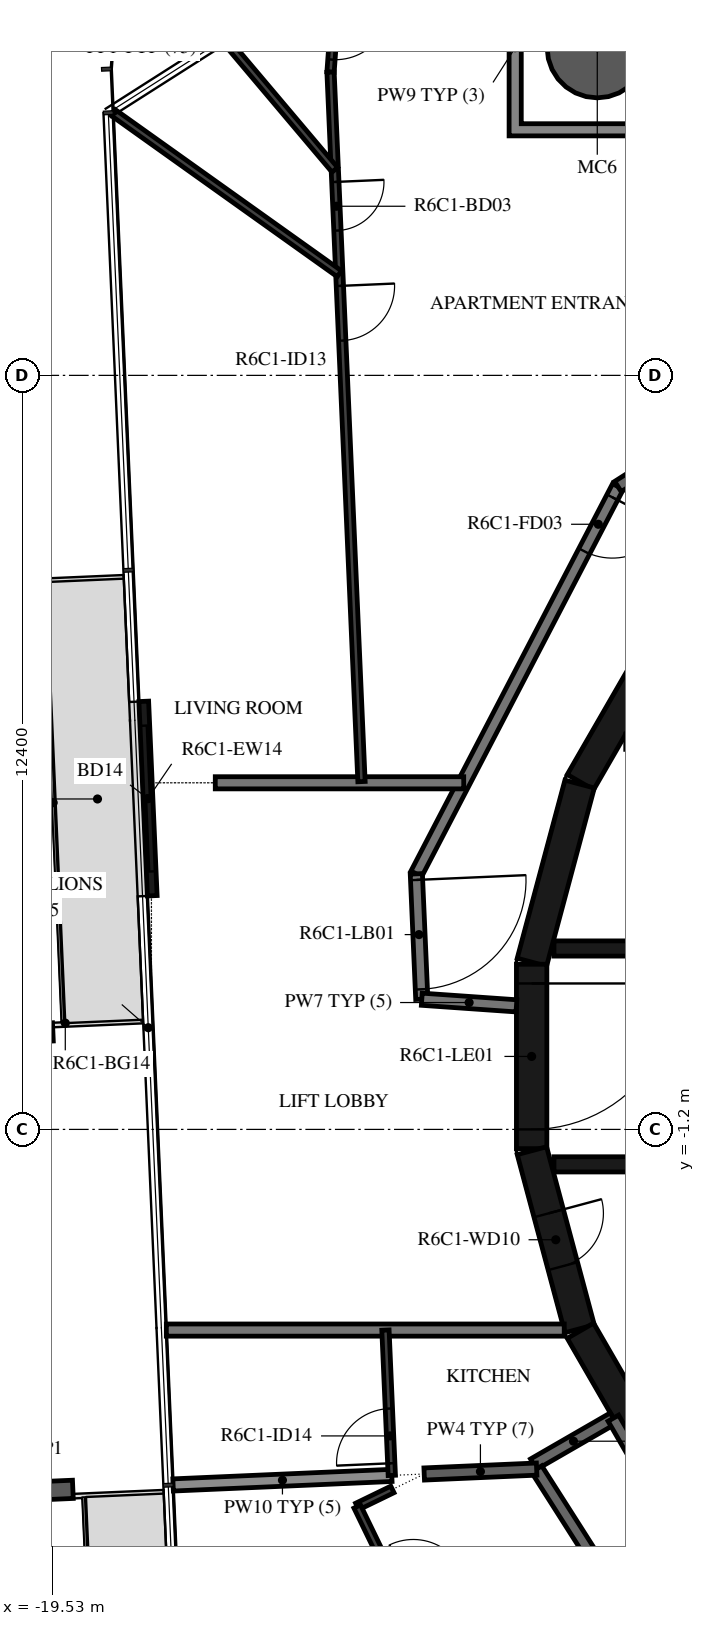
"""IFC4 building model, lengths in metres.
Left out: names, types, materials, properties, quantities, classifications, styles, units other than length and angle.
Written with IfcOpenShell. Run it as: python <this file> out.ifc"""

import sys

from ifc_helpers import new_model, si_unit, direction, frame, frame_2d, origin, origin_2d, place, context, subcontext, project, spatial, polyline, rectangle, hollow_circle, i_section, outline, extrude, element, fill, save


model = new_model("IFC4")
c1 = context("Model", 3, precision=1e-05, world=origin(), true_north=direction((0.0, 1.0)))
c2 = subcontext(c1, "Body", "Model", "MODEL_VIEW")
j1 = project(units=[si_unit("LENGTHUNIT", "METRE"), si_unit("PLANEANGLEUNIT", "RADIAN")], contexts=[c1])
p1 = place(None, origin())
s1 = spatial("IfcSite", under=j1, at=p1, CompositionType="ELEMENT")
p2 = place(p1, origin())
s2 = spatial("IfcBuilding", under=s1, at=p2, CompositionType="ELEMENT")
p3 = place(p2, frame((0.0, 0.0, 251.2)))
s3 = spatial("IfcBuildingStorey", under=s2, at=p3, CompositionType="ELEMENT", Elevation=251.2)
p4 = place(p3, frame((-10.568, 16.588, -0.38), z_axis=(0.0, 0.0, 1.0), x_axis=(1.0, 0.0, 0.0)))
e1 = element("IfcColumn", 1, at=p4, inside=s3, PredefinedType="COLUMN", context=c2, shape_type="SweptSolid", body=[
    extrude(hollow_circle(Radius=0.825, WallThickness=0.04, at=origin_2d()), origin(), (0.0, 0.0, 1.0), 3.5),
])
for number, where, z_axis, x_axis in (
    (2, (-19.97, 0.384, -0.38), (0.0, 0.0, 1.0), (-0.044, 0.999, 0.0)),
    (3, (-19.642, -7.139, -0.38), (0.0, 0.0, 1.0), (-0.044, 0.999, 0.0)),
):
    element("IfcColumn", number, at=place(p3, frame(where, z_axis=z_axis, x_axis=x_axis)), inside=s3, PredefinedType="COLUMN", context=c2, shape_type="SweptSolid", body=[
        extrude(i_section(OverallWidth=0.3, OverallDepth=0.9, WebThickness=0.019, FlangeThickness=0.035, FilletRadius=0.03, at=origin_2d()), origin(), (0.0, 0.0, 1.0), 3.5),
    ])
p5 = place(p3, frame((-18.026, 5.839, 0.0), z_axis=(0.0, 0.0, 1.0), x_axis=(0.043563034632, -0.999050680403, 0.0)))
e4 = element("IfcWall", 4, at=p5, inside=s3, PredefinedType="STANDARD", context=c2, shape_type="SweptSolid", body=[
    extrude(rectangle(XDim=3.2, YDim=0.16, at=frame_2d((1.6, 0.0))), origin(), (0.0, 0.0, 1.0), 3.12),
])
p6 = place(p5, frame((0.4, 0.0, 0.0)))
e5 = element("IfcOpeningElement", 5, at=p6, cuts=e4, PredefinedType="OPENING", context=c2, shape_type="SweptSolid", body=[
    extrude(rectangle(XDim=2.4, YDim=2.4, at=frame_2d((1.2, 1.2))), frame((0.0, 0.09, 0.0), z_axis=(0.0, -1.0, 0.0), x_axis=(1.0, 0.0, 0.0)), (0.0, 0.0, 1.0), 0.18),
])
for number, where, z_axis, x_axis in (
    (6, (-9.329, 7.137, 0.0), (0.0, 0.0, 1.0), (-0.5, -0.866, 0.0)),
    (7, (-10.858, 4.479, 0.0), (0.0, 0.0, 1.0), (-0.259, -0.966, 0.0)),
):
    element("IfcWall", number, at=place(p3, frame(where, z_axis=z_axis, x_axis=x_axis)), inside=s3, PredefinedType="SHEAR", context=c2, shape_type="SweptSolid", body=[
        extrude(rectangle(XDim=3.033, YDim=0.5, at=frame_2d((1.516, 0.0))), origin(), (0.0, 0.0, 1.0), 3.12),
    ])
p7 = place(p3, frame((-11.647, 1.516, 0.0), z_axis=(0.0, 0.0, 1.0), x_axis=(0.0, -1.0, 0.0)))
e8 = element("IfcWall", 8, at=p7, inside=s3, PredefinedType="SHEAR", context=c2, shape_type="SweptSolid", body=[
    extrude(rectangle(XDim=3.033, YDim=0.5, at=frame_2d((1.516, 0.0))), origin(), (0.0, 0.0, 1.0), 3.12),
])
p8 = place(p7, frame((0.316, 0.0, 0.0)))
e9 = element("IfcOpeningElement", 9, at=p8, cuts=e8, PredefinedType="OPENING", context=c2, shape_type="SweptSolid", body=[
    extrude(rectangle(XDim=2.4, YDim=2.1, at=frame_2d((1.2, 1.05))), frame((0.0, 0.26, 0.0), z_axis=(0.0, -1.0, 0.0), x_axis=(1.0, 0.0, 0.0)), (0.0, 0.0, 1.0), 0.52),
])
p9 = place(p3, frame((-11.643, -1.55, 0.0), z_axis=(0.0, 0.0, 1.0), x_axis=(0.258734743916, -0.965948410781, 0.0)))
e10 = element("IfcWall", 10, at=p9, inside=s3, PredefinedType="SHEAR", context=c2, shape_type="SweptSolid", body=[
    extrude(rectangle(XDim=3.033, YDim=0.5, at=frame_2d((1.516, 0.0))), origin(), (0.0, 0.0, 1.0), 3.12),
])
p10 = place(p9, frame((1.066, 0.0, 0.0)))
e11 = element("IfcOpeningElement", 11, at=p10, cuts=e10, PredefinedType="OPENING", context=c2, shape_type="SweptSolid", body=[
    extrude(rectangle(XDim=0.9, YDim=2.1, at=frame_2d((0.45, 1.05))), frame((0.0, 0.26, 0.0), z_axis=(0.0, -1.0, 0.0), x_axis=(1.0, 0.0, 0.0)), (0.0, 0.0, 1.0), 0.52),
])
p11 = place(p3, frame((-10.845, -4.51, 0.0), z_axis=(0.0, 0.0, 1.0), x_axis=(0.500087131594, -0.865975092491, 0.0)))
e12 = element("IfcWall", 12, at=p11, inside=s3, PredefinedType="SHEAR", context=c2, shape_type="SweptSolid", body=[
    extrude(rectangle(XDim=3.033, YDim=0.5, at=frame_2d((1.516, 0.0))), origin(), (0.0, 0.0, 1.0), 3.12),
])
p12 = place(p3, frame((-11.28, 1.775, 0.0), z_axis=(0.0, 0.0, 1.0), x_axis=(1.0, 0.0, 0.0)))
e13 = element("IfcWall", 13, at=p12, inside=s3, PredefinedType="SHEAR", context=c2, shape_type="SweptSolid", body=[
    extrude(rectangle(XDim=14.38, YDim=0.25, at=frame_2d((7.19, 0.0))), origin(), (0.0, 0.0, 1.0), 3.12),
])
p13 = place(p12, frame((10.73, 0.0, 0.0)))
e14 = element("IfcOpeningElement", 14, at=p13, cuts=e13, PredefinedType="OPENING", context=c2, shape_type="SweptSolid", body=[
    extrude(rectangle(XDim=1.1, YDim=2.1, at=frame_2d((0.55, 1.05))), frame((0.0, 0.135, 0.0), z_axis=(0.0, -1.0, 0.0), x_axis=(1.0, 0.0, 0.0)), (0.0, 0.0, 1.0), 0.27),
])
p14 = place(p12, frame((12.88, 0.0, 0.0)))
e15 = element("IfcOpeningElement", 15, at=p14, cuts=e13, PredefinedType="OPENING", context=c2, shape_type="SweptSolid", body=[
    extrude(rectangle(XDim=1.1, YDim=2.1, at=frame_2d((0.55, 1.05))), frame((0.0, 0.135, 0.0), z_axis=(0.0, -1.0, 0.0), x_axis=(1.0, 0.0, 0.0)), (0.0, 0.0, 1.0), 0.27),
])
p15 = place(p12, frame((5.455, 0.0, 0.0)))
e16 = element("IfcOpeningElement", 16, at=p15, cuts=e13, PredefinedType="OPENING", context=c2, shape_type="SweptSolid", body=[
    extrude(rectangle(XDim=0.9, YDim=2.1, at=frame_2d((0.45, 1.05))), frame((0.0, 0.135, 0.0), z_axis=(0.0, -1.0, 0.0), x_axis=(1.0, 0.0, 0.0)), (0.0, 0.0, 1.0), 0.27),
])
p16 = place(p3, frame((-11.28, -1.775, 0.0), z_axis=(0.0, 0.0, 1.0), x_axis=(1.0, 0.0, 0.0)))
e17 = element("IfcWall", 17, at=p16, inside=s3, PredefinedType="SHEAR", context=c2, shape_type="SweptSolid", body=[
    extrude(rectangle(XDim=14.38, YDim=0.25, at=frame_2d((7.19, 0.0))), origin(), (0.0, 0.0, 1.0), 3.12),
])
p17 = place(p16, frame((12.88, 0.0, 0.0)))
e18 = element("IfcOpeningElement", 18, at=p17, cuts=e17, PredefinedType="OPENING", context=c2, shape_type="SweptSolid", body=[
    extrude(rectangle(XDim=1.1, YDim=2.1, at=frame_2d((0.55, 1.05))), frame((0.0, 0.135, 0.0), z_axis=(0.0, -1.0, 0.0), x_axis=(1.0, 0.0, 0.0)), (0.0, 0.0, 1.0), 0.27),
])
p18 = place(p16, frame((6.53, 0.0, 0.0)))
e19 = element("IfcOpeningElement", 19, at=p18, cuts=e17, PredefinedType="OPENING", context=c2, shape_type="SweptSolid", body=[
    extrude(rectangle(XDim=0.9, YDim=2.1, at=frame_2d((0.45, 1.05))), frame((0.0, 0.135, 0.0), z_axis=(0.0, -1.0, 0.0), x_axis=(1.0, 0.0, 0.0)), (0.0, 0.0, 1.0), 0.27),
])
p19 = place(p16, frame((8.68, 0.0, 0.0)))
e20 = element("IfcOpeningElement", 20, at=p19, cuts=e17, PredefinedType="OPENING", context=c2, shape_type="SweptSolid", body=[
    extrude(rectangle(XDim=0.9, YDim=2.1, at=frame_2d((0.45, 1.05))), frame((0.0, 0.135, 0.0), z_axis=(0.0, -1.0, 0.0), x_axis=(1.0, 0.0, 0.0)), (0.0, 0.0, 1.0), 0.27),
])
p20 = place(p16, frame((10.83, 0.0, 0.0)))
e21 = element("IfcOpeningElement", 21, at=p20, cuts=e17, PredefinedType="OPENING", context=c2, shape_type="SweptSolid", body=[
    extrude(rectangle(XDim=0.9, YDim=2.1, at=frame_2d((0.45, 1.05))), frame((0.0, 0.135, 0.0), z_axis=(0.0, -1.0, 0.0), x_axis=(1.0, 0.0, 0.0)), (0.0, 0.0, 1.0), 0.27),
])
p21 = place(p3, frame((-10.228, 9.372, 0.0), z_axis=(0.0, 0.0, 1.0), x_axis=(-0.461759464021, -0.887005184532, 0.0)))
e22 = element("IfcWall", 22, at=p21, inside=s3, PredefinedType="STANDARD", context=c2, shape_type="SweptSolid", body=[
    extrude(rectangle(XDim=7.181, YDim=0.2, at=frame_2d((3.591, 0.0))), origin(), (0.0, 0.0, 1.0), 3.12),
])
p22 = place(p21, frame((0.2, 0.0, 0.0)))
e23 = element("IfcOpeningElement", 23, at=p22, cuts=e22, PredefinedType="OPENING", context=c2, shape_type="SweptSolid", body=[
    extrude(rectangle(XDim=1.0, YDim=2.1, at=frame_2d((0.5, 1.05))), frame((0.0, 0.11, 0.0), z_axis=(0.0, -1.0, 0.0), x_axis=(1.0, 0.0, 0.0)), (0.0, 0.0, 1.0), 0.22),
])
p23 = place(p3, frame((-13.544, 3.003, 0.0), z_axis=(0.0, 0.0, 1.0), x_axis=(0.043652842459, -0.99904676034, 0.0)))
e24 = element("IfcWall", 24, at=p23, inside=s3, PredefinedType="STANDARD", context=c2, shape_type="SweptSolid", body=[
    extrude(rectangle(XDim=2.064, YDim=0.2, at=frame_2d((1.032, 0.0))), origin(), (0.0, 0.0, 1.0), 3.12),
])
p24 = place(p23, frame((0.1, 0.0, 0.0)))
e25 = element("IfcOpeningElement", 25, at=p24, cuts=e24, PredefinedType="OPENING", context=c2, shape_type="SweptSolid", body=[
    extrude(rectangle(XDim=1.8, YDim=2.1, at=frame_2d((0.9, 1.05))), frame((0.0, 0.11, 0.0), z_axis=(0.0, -1.0, 0.0), x_axis=(1.0, 0.0, 0.0)), (0.0, 0.0, 1.0), 0.22),
])
p25 = place(p3, frame((-13.454, 0.941, 0.0), z_axis=(0.0, 0.0, 1.0), x_axis=(0.99755155062, -0.069934997354, 0.0)))
e26 = element("IfcWall", 26, at=p25, inside=s3, PredefinedType="STANDARD", context=c2, shape_type="SweptSolid", body=[
    extrude(rectangle(XDim=1.561, YDim=0.2, at=frame_2d((0.78, 0.0))), origin(), (0.0, 0.0, 1.0), 3.12),
])
p26 = place(p3, frame((-4.172, 13.231, 0.0), z_axis=(0.0, 0.0, 1.0), x_axis=(-0.843388394728, -0.537304397561, 0.0)))
e27 = element("IfcWall", 27, at=p26, inside=s3, PredefinedType="STANDARD", context=c2, shape_type="SweptSolid", body=[
    extrude(rectangle(XDim=7.181, YDim=0.2, at=frame_2d((3.59, 0.0))), origin(), (0.0, 0.0, 1.0), 3.12),
])
p27 = place(p3, frame((-10.303, -5.949, 0.0), z_axis=(0.0, 0.0, 1.0), x_axis=(-0.866043382451, -0.499968858743, 0.0)))
e28 = element("IfcWall", 28, at=p27, inside=s3, PredefinedType="STANDARD", context=c2, shape_type="SweptSolid", body=[
    extrude(rectangle(XDim=1.515, YDim=0.2, at=frame_2d((0.758, 0.0))), origin(), (0.0, 0.0, 1.0), 3.12),
])
p28 = place(p3, frame((-9.52, -7.305, 0.0), z_axis=(0.0, 0.0, 1.0), x_axis=(-0.500028278809, 0.866009076391, 0.0)))
e29 = element("IfcWall", 29, at=p28, inside=s3, PredefinedType="STANDARD", context=c2, shape_type="SweptSolid", body=[
    extrude(rectangle(XDim=1.566, YDim=0.2, at=frame_2d((0.783, 0.0))), origin(), (0.0, 0.0, 1.0), 3.12),
])
p29 = place(p3, frame((-11.565, -6.786, 0.0), z_axis=(0.0, 0.0, 1.0), x_axis=(0.537297327359, -0.843392898958, 0.0)))
e30 = element("IfcWall", 30, at=p29, inside=s3, PredefinedType="STANDARD", context=c2, shape_type="SweptSolid", body=[
    extrude(rectangle(XDim=4.081, YDim=0.2, at=frame_2d((2.041, 0.0))), origin(), (0.0, 0.0, 1.0), 3.12),
])
p30 = place(p3, frame((-12.764, 4.5, 0.0), z_axis=(0.0, 0.0, 1.0), x_axis=(-1.0, 0.0, 0.0)))
e31 = element("IfcWall", 31, at=p30, inside=s3, PredefinedType="STANDARD", context=c2, shape_type="SweptSolid", body=[
    extrude(rectangle(XDim=4.086, YDim=0.2, at=frame_2d((2.043, 0.0))), origin(), (0.0, 0.0, 1.0), 3.12),
])
p31 = place(p3, frame((-17.655, -4.5, 0.0), z_axis=(0.0, 0.0, 1.0), x_axis=(1.0, 0.0, 0.0)))
e32 = element("IfcWall", 32, at=p31, inside=s3, PredefinedType="STANDARD", context=c2, shape_type="SweptSolid", body=[
    extrude(rectangle(XDim=6.543, YDim=0.2, at=frame_2d((3.272, 0.0))), origin(), (0.0, 0.0, 1.0), 3.12),
])
p32 = place(p3, frame((-17.544, -7.047, 0.0), z_axis=(0.0, 0.0, 1.0), x_axis=(0.999045894436, 0.043672655174, 0.0)))
e33 = element("IfcWall", 33, at=p32, inside=s3, PredefinedType="STANDARD", context=c2, shape_type="SweptSolid", body=[
    extrude(rectangle(XDim=3.6, YDim=0.2, at=frame_2d((1.8, 0.0))), origin(), (0.0, 0.0, 1.0), 2.73),
])
p33 = place(p3, frame((-13.414, -6.867, 0.0), z_axis=(0.0, 0.0, 1.0), x_axis=(0.999046427216, 0.043660465726, 0.0)))
e34 = element("IfcWall", 34, at=p33, inside=s3, PredefinedType="STANDARD", context=c2, shape_type="SweptSolid", body=[
    extrude(rectangle(XDim=1.851, YDim=0.2, at=frame_2d((0.925, 0.0))), origin(), (0.0, 0.0, 1.0), 3.12),
])
p34 = place(p3, frame((-14.865, 17.411, 0.0), z_axis=(0.0, 0.0, 1.0), x_axis=(-0.072618457011, -0.997359794508, 0.0)))
e35 = element("IfcWall", 35, at=p34, inside=s3, PredefinedType="PARTITIONING", context=c2, shape_type="SweptSolid", body=[
    extrude(rectangle(XDim=1.227, YDim=0.12, at=frame_2d((0.614, 0.0))), origin(), (0.0, 0.0, 1.0), 3.12),
])
p35 = place(p34, frame((0.12, 0.0, 0.0)))
e36 = element("IfcOpeningElement", 36, at=p35, cuts=e35, PredefinedType="OPENING", context=c2, shape_type="SweptSolid", body=[
    extrude(rectangle(XDim=0.9, YDim=2.1, at=frame_2d((0.45, 1.05))), frame((0.0, 0.07, 0.0), z_axis=(0.0, -1.0, 0.0), x_axis=(1.0, 0.0, 0.0)), (0.0, 0.0, 1.0), 0.14),
])
p36 = place(p3, frame((-14.955, 16.187, 0.0), z_axis=(0.0, 0.0, 1.0), x_axis=(0.04360777668, -0.999048728448, 0.0)))
e37 = element("IfcWall", 37, at=p36, inside=s3, PredefinedType="PARTITIONING", context=c2, shape_type="SweptSolid", body=[
    extrude(rectangle(XDim=11.679, YDim=0.12, at=frame_2d((5.839, 0.0))), origin(), (0.0, 0.0, 1.0), 3.12),
])
p37 = place(p36, frame((1.808, 0.0, 0.0)))
e38 = element("IfcOpeningElement", 38, at=p37, cuts=e37, PredefinedType="OPENING", context=c2, shape_type="SweptSolid", body=[
    extrude(rectangle(XDim=0.8, YDim=2.1, at=frame_2d((0.4, 1.05))), frame((0.0, 0.07, 0.0), z_axis=(0.0, -1.0, 0.0), x_axis=(1.0, 0.0, 0.0)), (0.0, 0.0, 1.0), 0.14),
])
p38 = place(p36, frame((3.519, 0.0, 0.0)))
e39 = element("IfcOpeningElement", 39, at=p38, cuts=e37, PredefinedType="OPENING", context=c2, shape_type="SweptSolid", body=[
    extrude(rectangle(XDim=0.9, YDim=2.1, at=frame_2d((0.45, 1.05))), frame((0.0, 0.07, 0.0), z_axis=(0.0, -1.0, 0.0), x_axis=(1.0, 0.0, 0.0)), (0.0, 0.0, 1.0), 0.14),
])
p39 = place(p3, frame((-18.269, 18.589, 0.0), z_axis=(0.0, 0.0, 1.0), x_axis=(0.645124067673, -0.764077834588, 0.0)))
e40 = element("IfcWall", 40, at=p39, inside=s3, PredefinedType="PARTITIONING", context=c2, shape_type="SweptSolid", body=[
    extrude(rectangle(XDim=5.246, YDim=0.12, at=frame_2d((2.623, 0.0))), origin(), (0.0, 0.0, 1.0), 3.12),
])
p40 = place(p3, frame((-18.529, 15.522, 0.0), z_axis=(0.0, 0.0, 1.0), x_axis=(0.814350646776, -0.580373176582, 0.0)))
e41 = element("IfcWall", 41, at=p40, inside=s3, PredefinedType="PARTITIONING", context=c2, shape_type="SweptSolid", body=[
    extrude(rectangle(XDim=4.567, YDim=0.12, at=frame_2d((2.284, 0.0))), origin(), (0.0, 0.0, 1.0), 3.12),
])
p41 = place(p3, frame((-13.947, -6.89, 0.0), z_axis=(0.0, 0.0, 1.0), x_axis=(-0.043680814195, 0.999045537737, 0.0)))
e42 = element("IfcWall", 42, at=p41, inside=s3, PredefinedType="PARTITIONING", context=c2, shape_type="SweptSolid", body=[
    extrude(rectangle(XDim=2.392, YDim=0.12, at=frame_2d((1.196, 0.0))), origin(), (0.0, 0.0, 1.0), 3.12),
])
p42 = place(p41, frame((0.2, 0.0, 0.0)))
e43 = element("IfcOpeningElement", 43, at=p42, cuts=e42, PredefinedType="OPENING", context=c2, shape_type="SweptSolid", body=[
    extrude(rectangle(XDim=0.9, YDim=2.1, at=frame_2d((0.45, 1.05))), frame((0.0, 0.07, 0.0), z_axis=(0.0, -1.0, 0.0), x_axis=(1.0, 0.0, 0.0)), (0.0, 0.0, 1.0), 0.14),
])
p43 = place(p3, frame((-13.937, -7.121, 0.0), z_axis=(0.0, 0.0, 1.0), x_axis=(-0.899601864835, -0.436710985418, 0.0)))
e44 = element("IfcWall", 44, at=p43, inside=s3, PredefinedType="PARTITIONING", context=c2, shape_type="SweptSolid", body=[
    extrude(rectangle(XDim=0.644, YDim=0.12, at=frame_2d((0.322, 0.0))), origin(), (0.0, 0.0, 1.0), 3.12),
])
p44 = place(p3, frame((-14.516, -7.402, 0.0), z_axis=(0.0, 0.0, 1.0), x_axis=(0.436676244377, -0.899618729016, 0.0)))
e45 = element("IfcWall", 45, at=p44, inside=s3, PredefinedType="PARTITIONING", context=c2, shape_type="SweptSolid", body=[
    extrude(rectangle(XDim=1.487, YDim=0.12, at=frame_2d((0.744, 0.0))), origin(), (0.0, 0.0, 1.0), 3.12),
])
p45 = place(p3, origin())
e46 = element("IfcWall", 46, at=p45, inside=s3, PredefinedType="STANDARD", context=c2, shape_type="SweptSolid", body=[
    extrude(outline(polyline([(-9.118, 18.038), (-9.118, 15.138), (-12.018, 15.138), (-12.018, 18.038), (-9.118, 18.038)]), holes=[polyline([(-11.818, 15.338), (-9.318, 15.338), (-9.318, 17.838), (-11.818, 17.838), (-11.818, 15.338)])]), origin(), (0.0, 0.0, 1.0), 3.12),
])
p46 = place(p6, origin())
e47 = element("IfcDoor", 47, at=p46, inside=s3, OperationType="DOUBLE_DOOR_SLIDING", PredefinedType="DOOR", context=c2, shape_type="SweptSolid", body=[
    extrude(rectangle(XDim=2.4, YDim=2.4, at=frame_2d((1.2, 1.2))), frame((0.0, 0.025, 0.0), z_axis=(0.0, -1.0, 0.0), x_axis=(1.0, 0.0, 0.0)), (0.0, 0.0, 1.0), 0.05),
])
fill(e5, e47)
p47 = place(p8, origin())
e48 = element("IfcDoor", 48, at=p47, inside=s3, OperationType="DOUBLE_DOOR_SINGLE_SWING", PredefinedType="DOOR", context=c2, shape_type="SweptSolid", body=[
    extrude(rectangle(XDim=2.4, YDim=2.1, at=frame_2d((1.2, 1.05))), frame((0.0, 0.025, 0.0), z_axis=(0.0, -1.0, 0.0), x_axis=(1.0, 0.0, 0.0)), (0.0, 0.0, 1.0), 0.05),
])
fill(e9, e48)
p48 = place(p10, origin())
e49 = element("IfcDoor", 49, at=p48, inside=s3, OperationType="SINGLE_SWING_RIGHT", PredefinedType="DOOR", context=c2, shape_type="SweptSolid", body=[
    extrude(rectangle(XDim=0.9, YDim=2.1, at=frame_2d((0.45, 1.05))), frame((0.0, 0.025, 0.0), z_axis=(0.0, -1.0, 0.0), x_axis=(1.0, 0.0, 0.0)), (0.0, 0.0, 1.0), 0.05),
])
fill(e11, e49)
p49 = place(p22, origin())
e50 = element("IfcDoor", 50, at=p49, inside=s3, OperationType="SINGLE_SWING_LEFT", PredefinedType="DOOR", context=c2, shape_type="SweptSolid", body=[
    extrude(rectangle(XDim=1.0, YDim=2.1, at=frame_2d((0.5, 1.05))), frame((0.0, 0.025, 0.0), z_axis=(0.0, -1.0, 0.0), x_axis=(1.0, 0.0, 0.0)), (0.0, 0.0, 1.0), 0.05),
])
fill(e23, e50)
p50 = place(p35, origin())
e51 = element("IfcDoor", 51, at=p50, inside=s3, OperationType="SINGLE_SWING_LEFT", PredefinedType="DOOR", context=c2, shape_type="SweptSolid", body=[
    extrude(rectangle(XDim=0.9, YDim=2.1, at=frame_2d((0.45, 1.05))), frame((0.0, 0.025, 0.0), z_axis=(0.0, -1.0, 0.0), x_axis=(1.0, 0.0, 0.0)), (0.0, 0.0, 1.0), 0.05),
])
fill(e36, e51)
p51 = place(p37, origin())
e52 = element("IfcDoor", 52, at=p51, inside=s3, OperationType="SINGLE_SWING_LEFT", PredefinedType="DOOR", context=c2, shape_type="SweptSolid", body=[
    extrude(rectangle(XDim=0.8, YDim=2.1, at=frame_2d((0.4, 1.05))), frame((0.0, 0.025, 0.0), z_axis=(0.0, -1.0, 0.0), x_axis=(1.0, 0.0, 0.0)), (0.0, 0.0, 1.0), 0.05),
])
fill(e38, e52)
p52 = place(p38, origin())
e53 = element("IfcDoor", 53, at=p52, inside=s3, OperationType="SINGLE_SWING_LEFT", PredefinedType="DOOR", context=c2, shape_type="SweptSolid", body=[
    extrude(rectangle(XDim=0.9, YDim=2.1, at=frame_2d((0.45, 1.05))), frame((0.0, 0.025, 0.0), z_axis=(0.0, -1.0, 0.0), x_axis=(1.0, 0.0, 0.0)), (0.0, 0.0, 1.0), 0.05),
])
fill(e39, e53)
p53 = place(p42, origin())
e54 = element("IfcDoor", 54, at=p53, inside=s3, OperationType="SINGLE_SWING_LEFT", PredefinedType="DOOR", context=c2, shape_type="SweptSolid", body=[
    extrude(rectangle(XDim=0.9, YDim=2.1, at=frame_2d((0.45, 1.05))), frame((0.0, 0.025, 0.0), z_axis=(0.0, -1.0, 0.0), x_axis=(1.0, 0.0, 0.0)), (0.0, 0.0, 1.0), 0.05),
])
fill(e43, e54)
p54 = place(p24, origin())
e55 = element("IfcDoor", 55, at=p54, inside=s3, OperationType="DOUBLE_DOOR_SINGLE_SWING", PredefinedType="DOOR", context=c2, shape_type="SweptSolid", body=[
    extrude(rectangle(XDim=1.8, YDim=2.1, at=frame_2d((0.9, 1.05))), frame((0.0, 0.025, 0.0), z_axis=(0.0, -1.0, 0.0), x_axis=(1.0, 0.0, 0.0)), (0.0, 0.0, 1.0), 0.05),
])
fill(e25, e55)
save(model, sys.argv[1])
